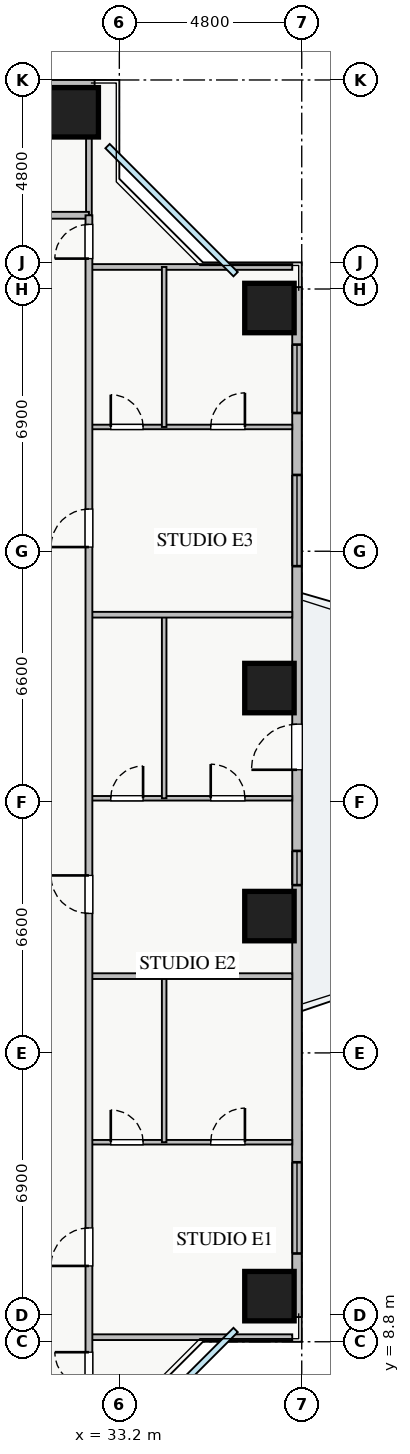
"""IFC4 building model, lengths in metres.
Left out: names, types, materials, properties, quantities, classifications, styles, units other than length and angle.
Written with IfcOpenShell. Run it as: python <this file> out.ifc"""

import sys

from ifc_helpers import new_model, si_unit, direction, frame, frame_2d, origin, origin_2d, place, context, subcontext, project, spatial, rectangle, extrude, source, transform, mapped, element, fill, save


model = new_model("IFC4")
c1 = context("Model", 3, precision=1e-05, world=origin(), true_north=direction((0.0, 1.0)))
c2 = subcontext(c1, "Body", "Model", "MODEL_VIEW")
j1 = project(units=[si_unit("LENGTHUNIT", "METRE"), si_unit("PLANEANGLEUNIT", "RADIAN")], contexts=[c1])
p1 = place(None, origin())
s1 = spatial("IfcSite", under=j1, at=p1, CompositionType="ELEMENT")
p2 = place(p1, origin())
s2 = spatial("IfcBuilding", under=s1, at=p2, CompositionType="ELEMENT")
p3 = place(p2, frame((0.0, 0.0, 56.75)))
s3 = spatial("IfcBuildingStorey", under=s2, at=p3, CompositionType="ELEMENT", Elevation=56.75)
m1 = source(origin(), c2, "Body", "SweptSolid", [
    extrude(rectangle(XDim=1.3, YDim=1.3, at=origin_2d()), origin(), (0.0, 0.0, 1.0), 3.25),
])
for number, where, z_axis, x_axis in (
    (1, (37.15, 10.0, 0.0), (0.0, 0.0, 1.0), (1.0, 0.0, 0.0)),
    (2, (37.15, 20.0, 0.0), (0.0, 0.0, 1.0), (1.0, 0.0, 0.0)),
    (3, (37.15, 26.0, 0.0), (0.0, 0.0, 1.0), (1.0, 0.0, 0.0)),
    (4, (37.15, 36.0, 0.0), (0.0, 0.0, 1.0), (1.0, 0.0, 0.0)),
    (5, (32.0, 41.15, 0.0), (0.0, 0.0, 1.0), (1.0, 0.0, 0.0)),
):
    element("IfcColumn", number, at=place(p3, frame(where, z_axis=z_axis, x_axis=x_axis)), inside=s3, PredefinedType="COLUMN", context=c2, shape_type="MappedRepresentation", body=[
        mapped(m1, transform((0.0, 0.0, 0.0), x_axis=(1.0, 0.0, 0.0), y_axis=(0.0, 1.0, 0.0), z_axis=(0.0, 0.0, 1.0), scale=1.0)),
    ])
p4 = place(p3, frame((5.45, 41.875, 0.0), z_axis=(0.0, 0.0, 1.0), x_axis=(1.0, 0.0, 0.0)))
e6 = element("IfcWall", 6, at=p4, inside=s3, PredefinedType="STANDARD", context=c2, shape_type="SweptSolid", body=[
    extrude(rectangle(XDim=27.1, YDim=0.25, at=frame_2d((13.55, 0.0))), origin(), (0.0, 0.0, 1.0), 2.61),
])
p5 = place(p4, frame((14.4, 0.0, 0.0)))
e7 = element("IfcOpeningElement", 7, at=p5, cuts=e6, PredefinedType="OPENING", context=c2, shape_type="SweptSolid", body=[
    extrude(rectangle(XDim=1.2, YDim=2.1, at=frame_2d((0.6, 1.05))), frame((0.0, 0.135, 0.0), z_axis=(0.0, -1.0, 0.0), x_axis=(1.0, 0.0, 0.0)), (0.0, 0.0, 1.0), 0.27),
])
p6 = place(p4, frame((1.5, 0.0, 0.9)))
e8 = element("IfcOpeningElement", 8, at=p6, cuts=e6, PredefinedType="OPENING", context=c2, shape_type="SweptSolid", body=[
    extrude(rectangle(XDim=1.5, YDim=1.5, at=frame_2d((0.75, 0.75))), frame((0.0, 0.135, 0.0), z_axis=(0.0, -1.0, 0.0), x_axis=(1.0, 0.0, 0.0)), (0.0, 0.0, 1.0), 0.27),
])
p7 = place(p4, frame((9.263, 0.0, 0.9)))
e9 = element("IfcOpeningElement", 9, at=p7, cuts=e6, PredefinedType="OPENING", context=c2, shape_type="SweptSolid", body=[
    extrude(rectangle(XDim=1.8, YDim=1.45, at=frame_2d((0.9, 0.725))), frame((0.0, 0.135, 0.0), z_axis=(0.0, -1.0, 0.0), x_axis=(1.0, 0.0, 0.0)), (0.0, 0.0, 1.0), 0.27),
])
p8 = place(p4, frame((18.774, 0.0, 0.9)))
e10 = element("IfcOpeningElement", 10, at=p8, cuts=e6, PredefinedType="OPENING", context=c2, shape_type="SweptSolid", body=[
    extrude(rectangle(XDim=1.5, YDim=1.5, at=frame_2d((0.75, 0.75))), frame((0.0, 0.135, 0.0), z_axis=(0.0, -1.0, 0.0), x_axis=(1.0, 0.0, 0.0)), (0.0, 0.0, 1.0), 0.27),
])
p9 = place(p4, frame((22.663, 0.0, 0.9)))
e11 = element("IfcOpeningElement", 11, at=p9, cuts=e6, PredefinedType="OPENING", context=c2, shape_type="SweptSolid", body=[
    extrude(rectangle(XDim=2.1, YDim=1.48, at=frame_2d((1.05, 0.74))), frame((0.0, 0.135, 0.0), z_axis=(0.0, -1.0, 0.0), x_axis=(1.0, 0.0, 0.0)), (0.0, 0.0, 1.0), 0.27),
])
p10 = place(p4, frame((5.134, 0.0, 0.9)))
e12 = element("IfcOpeningElement", 12, at=p10, cuts=e6, PredefinedType="OPENING", context=c2, shape_type="SweptSolid", body=[
    extrude(rectangle(XDim=2.4, YDim=1.5, at=frame_2d((1.2, 0.75))), frame((0.0, 0.135, 0.0), z_axis=(0.0, -1.0, 0.0), x_axis=(1.0, 0.0, 0.0)), (0.0, 0.0, 1.0), 0.27),
])
p11 = place(p3, frame((37.875, 9.45, 0.0), z_axis=(0.0, 0.0, 1.0), x_axis=(0.0, 1.0, 0.0)))
e13 = element("IfcWall", 13, at=p11, inside=s3, PredefinedType="STANDARD", context=c2, shape_type="SweptSolid", body=[
    extrude(rectangle(XDim=27.1, YDim=0.25, at=frame_2d((13.55, 0.0))), origin(), (0.0, 0.0, 1.0), 2.61),
])
p12 = place(p11, frame((14.4, 0.0, 0.0)))
e14 = element("IfcOpeningElement", 14, at=p12, cuts=e13, PredefinedType="OPENING", context=c2, shape_type="SweptSolid", body=[
    extrude(rectangle(XDim=1.2, YDim=2.1, at=frame_2d((0.6, 1.05))), frame((0.0, 0.135, 0.0), z_axis=(0.0, -1.0, 0.0), x_axis=(1.0, 0.0, 0.0)), (0.0, 0.0, 1.0), 0.27),
])
p13 = place(p11, frame((1.673, 0.0, 0.9)))
e15 = element("IfcOpeningElement", 15, at=p13, cuts=e13, PredefinedType="OPENING", context=c2, shape_type="SweptSolid", body=[
    extrude(rectangle(XDim=2.4, YDim=1.5, at=frame_2d((1.2, 0.75))), frame((0.0, 0.135, 0.0), z_axis=(0.0, -1.0, 0.0), x_axis=(1.0, 0.0, 0.0)), (0.0, 0.0, 1.0), 0.27),
])
p14 = place(p11, frame((23.788, 0.0, 0.9)))
e16 = element("IfcOpeningElement", 16, at=p14, cuts=e13, PredefinedType="OPENING", context=c2, shape_type="SweptSolid", body=[
    extrude(rectangle(XDim=1.8, YDim=1.5, at=frame_2d((0.9, 0.75))), frame((0.0, 0.135, 0.0), z_axis=(0.0, -1.0, 0.0), x_axis=(1.0, 0.0, 0.0)), (0.0, 0.0, 1.0), 0.27),
])
p15 = place(p11, frame((19.758, 0.0, 0.9)))
e17 = element("IfcOpeningElement", 17, at=p15, cuts=e13, PredefinedType="OPENING", context=c2, shape_type="SweptSolid", body=[
    extrude(rectangle(XDim=2.4, YDim=1.5, at=frame_2d((1.2, 0.75))), frame((0.0, 0.135, 0.0), z_axis=(0.0, -1.0, 0.0), x_axis=(1.0, 0.0, 0.0)), (0.0, 0.0, 1.0), 0.27),
])
p16 = place(p11, frame((11.365, 0.0, 0.9)))
e18 = element("IfcOpeningElement", 18, at=p16, cuts=e13, PredefinedType="OPENING", context=c2, shape_type="SweptSolid", body=[
    extrude(rectangle(XDim=0.9, YDim=1.2, at=frame_2d((0.45, 0.6))), frame((0.0, 0.135, 0.0), z_axis=(0.0, -1.0, 0.0), x_axis=(1.0, 0.0, 0.0)), (0.0, 0.0, 1.0), 0.27),
])
p17 = place(p3, frame((32.4, 38.44, 0.0), z_axis=(0.0, 0.0, 1.0), x_axis=(0.0, 1.0, 0.0)))
e19 = element("IfcWall", 19, at=p17, inside=s3, PredefinedType="PARTITIONING", context=c2, shape_type="SweptSolid", body=[
    extrude(rectangle(XDim=3.31, YDim=0.15, at=frame_2d((1.655, 0.0))), origin(), (0.0, 0.0, 1.0), 3.07),
])
p18 = place(p3, frame((8.82, 38.44, 0.0), z_axis=(0.0, 0.0, 1.0), x_axis=(1.0, 0.0, 0.0)))
e20 = element("IfcWall", 20, at=p18, inside=s3, PredefinedType="PARTITIONING", context=c2, shape_type="SweptSolid", body=[
    extrude(rectangle(XDim=23.58, YDim=0.18, at=frame_2d((11.79, 0.0))), origin(), (0.0, 0.0, 1.0), 3.07),
])
p19 = place(p18, frame((5.99, 0.0, 0.0)))
e21 = element("IfcOpeningElement", 21, at=p19, cuts=e20, PredefinedType="OPENING", context=c2, shape_type="SweptSolid", body=[
    extrude(rectangle(XDim=1.0, YDim=2.05, at=frame_2d((0.5, 1.025))), frame((0.0, 0.1, 0.0), z_axis=(0.0, -1.0, 0.0), x_axis=(1.0, 0.0, 0.0)), (0.0, 0.0, 1.0), 0.2),
])
p20 = place(p18, frame((17.78, 0.0, 0.0)))
e22 = element("IfcOpeningElement", 22, at=p20, cuts=e20, PredefinedType="OPENING", context=c2, shape_type="SweptSolid", body=[
    extrude(rectangle(XDim=1.0, YDim=2.05, at=frame_2d((0.5, 1.025))), frame((0.0, 0.1, 0.0), z_axis=(0.0, -1.0, 0.0), x_axis=(1.0, 0.0, 0.0)), (0.0, 0.0, 1.0), 0.2),
])
for number, where, z_axis, x_axis in (
    (23, (32.4, 37.08, 0.0), (0.0, 0.0, 1.0), (1.0, 0.0, 0.0)),
    (24, (32.4, 8.92, 0.0), (0.0, 0.0, 1.0), (1.0, 0.0, 0.0)),
):
    element("IfcWall", number, at=place(p3, frame(where, z_axis=z_axis, x_axis=x_axis)), inside=s3, PredefinedType="PARTITIONING", context=c2, shape_type="SweptSolid", body=[
        extrude(rectangle(XDim=5.35, YDim=0.15, at=frame_2d((2.675, 0.0))), origin(), (0.0, 0.0, 1.0), 3.07),
    ])
p21 = place(p3, frame((32.4, 14.05, 0.0), z_axis=(0.0, 0.0, 1.0), x_axis=(1.0, 0.0, 0.0)))
e25 = element("IfcWall", 25, at=p21, inside=s3, PredefinedType="PLUMBINGWALL", context=c2, shape_type="SweptSolid", body=[
    extrude(rectangle(XDim=5.35, YDim=0.12, at=frame_2d((2.675, 0.0))), origin(), (0.0, 0.0, 1.0), 3.07),
])
p22 = place(p21, frame((0.575, 0.0, 0.0)))
e26 = element("IfcOpeningElement", 26, at=p22, cuts=e25, PredefinedType="OPENING", context=c2, shape_type="SweptSolid", body=[
    extrude(rectangle(XDim=0.85, YDim=2.05, at=frame_2d((0.425, 1.025))), frame((0.0, 0.07, 0.0), z_axis=(0.0, -1.0, 0.0), x_axis=(1.0, 0.0, 0.0)), (0.0, 0.0, 1.0), 0.14),
])
p23 = place(p21, frame((3.205, 0.0, 0.0)))
e27 = element("IfcOpeningElement", 27, at=p23, cuts=e25, PredefinedType="OPENING", context=c2, shape_type="SweptSolid", body=[
    extrude(rectangle(XDim=0.9, YDim=2.05, at=frame_2d((0.45, 1.025))), frame((0.0, 0.07, 0.0), z_axis=(0.0, -1.0, 0.0), x_axis=(1.0, 0.0, 0.0)), (0.0, 0.0, 1.0), 0.14),
])
p24 = place(p3, frame((34.38, 14.05, 0.0), z_axis=(0.0, 0.0, 1.0), x_axis=(0.0, 1.0, 0.0)))
e28 = element("IfcWall", 28, at=p24, inside=s3, PredefinedType="PLUMBINGWALL", context=c2, shape_type="SweptSolid", body=[
    extrude(rectangle(XDim=4.37, YDim=0.12, at=frame_2d((2.185, 0.0))), origin(), (0.0, 0.0, 1.0), 3.07),
])
p25 = place(p3, frame((32.4, 23.1, 0.0), z_axis=(0.0, 0.0, 1.0), x_axis=(1.0, 0.0, 0.0)))
e29 = element("IfcWall", 29, at=p25, inside=s3, PredefinedType="PLUMBINGWALL", context=c2, shape_type="SweptSolid", body=[
    extrude(rectangle(XDim=5.35, YDim=0.12, at=frame_2d((2.675, 0.0))), origin(), (0.0, 0.0, 1.0), 3.07),
])
p26 = place(p25, frame((0.575, 0.0, 0.0)))
e30 = element("IfcOpeningElement", 30, at=p26, cuts=e29, PredefinedType="OPENING", context=c2, shape_type="SweptSolid", body=[
    extrude(rectangle(XDim=0.85, YDim=2.05, at=frame_2d((0.425, 1.025))), frame((0.0, 0.07, 0.0), z_axis=(0.0, -1.0, 0.0), x_axis=(1.0, 0.0, 0.0)), (0.0, 0.0, 1.0), 0.14),
])
p27 = place(p25, frame((3.205, 0.0, 0.0)))
e31 = element("IfcOpeningElement", 31, at=p27, cuts=e29, PredefinedType="OPENING", context=c2, shape_type="SweptSolid", body=[
    extrude(rectangle(XDim=0.9, YDim=2.05, at=frame_2d((0.45, 1.025))), frame((0.0, 0.07, 0.0), z_axis=(0.0, -1.0, 0.0), x_axis=(1.0, 0.0, 0.0)), (0.0, 0.0, 1.0), 0.14),
])
p28 = place(p3, frame((34.38, 23.1, 0.0), z_axis=(0.0, 0.0, 1.0), x_axis=(0.0, 1.0, 0.0)))
e32 = element("IfcWall", 32, at=p28, inside=s3, PredefinedType="PLUMBINGWALL", context=c2, shape_type="SweptSolid", body=[
    extrude(rectangle(XDim=4.83, YDim=0.12, at=frame_2d((2.415, 0.0))), origin(), (0.0, 0.0, 1.0), 3.07),
])
p29 = place(p3, frame((32.4, 18.42, 0.0), z_axis=(0.0, 0.0, 1.0), x_axis=(1.0, 0.0, 0.0)))
e33 = element("IfcWall", 33, at=p29, inside=s3, PredefinedType="PARTITIONING", context=c2, shape_type="SweptSolid", body=[
    extrude(rectangle(XDim=5.35, YDim=0.15, at=frame_2d((2.675, 0.0))), origin(), (0.0, 0.0, 1.0), 2.715),
])
p30 = place(p3, frame((32.4, 32.87, 0.0), z_axis=(0.0, 0.0, 1.0), x_axis=(1.0, 0.0, 0.0)))
e34 = element("IfcWall", 34, at=p30, inside=s3, PredefinedType="PLUMBINGWALL", context=c2, shape_type="SweptSolid", body=[
    extrude(rectangle(XDim=5.35, YDim=0.12, at=frame_2d((2.675, 0.0))), origin(), (0.0, 0.0, 1.0), 3.07),
])
p31 = place(p30, frame((0.575, 0.0, 0.0)))
e35 = element("IfcOpeningElement", 35, at=p31, cuts=e34, PredefinedType="OPENING", context=c2, shape_type="SweptSolid", body=[
    extrude(rectangle(XDim=0.85, YDim=2.05, at=frame_2d((0.425, 1.025))), frame((0.0, 0.07, 0.0), z_axis=(0.0, -1.0, 0.0), x_axis=(1.0, 0.0, 0.0)), (0.0, 0.0, 1.0), 0.14),
])
p32 = place(p30, frame((3.205, 0.0, 0.0)))
e36 = element("IfcOpeningElement", 36, at=p32, cuts=e34, PredefinedType="OPENING", context=c2, shape_type="SweptSolid", body=[
    extrude(rectangle(XDim=0.9, YDim=2.05, at=frame_2d((0.45, 1.025))), frame((0.0, 0.07, 0.0), z_axis=(0.0, -1.0, 0.0), x_axis=(1.0, 0.0, 0.0)), (0.0, 0.0, 1.0), 0.14),
])
p33 = place(p3, frame((34.38, 32.87, 0.0), z_axis=(0.0, 0.0, 1.0), x_axis=(0.0, 1.0, 0.0)))
e37 = element("IfcWall", 37, at=p33, inside=s3, PredefinedType="PLUMBINGWALL", context=c2, shape_type="SweptSolid", body=[
    extrude(rectangle(XDim=4.21, YDim=0.12, at=frame_2d((2.105, 0.0))), origin(), (0.0, 0.0, 1.0), 3.07),
])
p34 = place(p3, frame((32.4, 27.93, 0.0), z_axis=(0.0, 0.0, 1.0), x_axis=(1.0, 0.0, 0.0)))
e38 = element("IfcWall", 38, at=p34, inside=s3, PredefinedType="PARTITIONING", context=c2, shape_type="SweptSolid", body=[
    extrude(rectangle(XDim=5.35, YDim=0.15, at=frame_2d((2.675, 0.0))), origin(), (0.0, 0.0, 1.0), 2.715),
])
p35 = place(p3, frame((32.4, 7.21, 0.0), z_axis=(0.0, 0.0, 1.0), x_axis=(0.0, 1.0, 0.0)))
e39 = element("IfcWall", 39, at=p35, inside=s3, PredefinedType="PARTITIONING", context=c2, shape_type="SweptSolid", body=[
    extrude(rectangle(XDim=31.23, YDim=0.18, at=frame_2d((15.615, 0.0))), origin(), (0.0, 0.0, 1.0), 2.815),
])
p36 = place(p35, frame((30.09, 0.0, 0.0)))
e40 = element("IfcOpeningElement", 40, at=p36, cuts=e39, PredefinedType="OPENING", context=c2, shape_type="SweptSolid", body=[
    extrude(rectangle(XDim=0.9, YDim=2.05, at=frame_2d((0.45, 1.025))), frame((0.0, 0.1, 0.0), z_axis=(0.0, -1.0, 0.0), x_axis=(1.0, 0.0, 0.0)), (0.0, 0.0, 1.0), 0.2),
])
p37 = place(p35, frame((0.415, 0.0, 0.0)))
e41 = element("IfcOpeningElement", 41, at=p37, cuts=e39, PredefinedType="OPENING", context=c2, shape_type="SweptSolid", body=[
    extrude(rectangle(XDim=0.9, YDim=2.05, at=frame_2d((0.45, 1.025))), frame((0.0, 0.1, 0.0), z_axis=(0.0, -1.0, 0.0), x_axis=(1.0, 0.0, 0.0)), (0.0, 0.0, 1.0), 0.2),
])
p38 = place(p35, frame((3.585, 0.0, 0.0)))
e42 = element("IfcOpeningElement", 42, at=p38, cuts=e39, PredefinedType="OPENING", context=c2, shape_type="SweptSolid", body=[
    extrude(rectangle(XDim=1.0, YDim=2.05, at=frame_2d((0.5, 1.025))), frame((0.0, 0.1, 0.0), z_axis=(0.0, -1.0, 0.0), x_axis=(1.0, 0.0, 0.0)), (0.0, 0.0, 1.0), 0.2),
])
p39 = place(p35, frame((12.86, 0.0, 0.0)))
e43 = element("IfcOpeningElement", 43, at=p39, cuts=e39, PredefinedType="OPENING", context=c2, shape_type="SweptSolid", body=[
    extrude(rectangle(XDim=1.0, YDim=2.05, at=frame_2d((0.5, 1.025))), frame((0.0, 0.1, 0.0), z_axis=(0.0, -1.0, 0.0), x_axis=(1.0, 0.0, 0.0)), (0.0, 0.0, 1.0), 0.2),
])
p40 = place(p35, frame((22.5, 0.0, 0.0)))
e44 = element("IfcOpeningElement", 44, at=p40, cuts=e39, PredefinedType="OPENING", context=c2, shape_type="SweptSolid", body=[
    extrude(rectangle(XDim=1.0, YDim=2.05, at=frame_2d((0.5, 1.025))), frame((0.0, 0.1, 0.0), z_axis=(0.0, -1.0, 0.0), x_axis=(1.0, 0.0, 0.0)), (0.0, 0.0, 1.0), 0.2),
])
m2 = source(origin(), c2, "Body", "SweptSolid", [
    extrude(rectangle(XDim=1.2, YDim=2.1, at=frame_2d((0.6, 1.05))), frame((0.0, 0.025, 0.0), z_axis=(0.0, -1.0, 0.0), x_axis=(1.0, 0.0, 0.0)), (0.0, 0.0, 1.0), 0.05),
])
p41 = place(p12, origin())
e45 = element("IfcDoor", 45, at=p41, inside=s3, OperationType="SINGLE_SWING_LEFT", PredefinedType="DOOR", context=c2, shape_type="MappedRepresentation", body=[
    mapped(m2, transform((0.0, 0.0, 0.0), x_axis=(1.0, 0.0, 0.0), y_axis=(0.0, 1.0, 0.0), z_axis=(0.0, 0.0, 1.0), scale=1.0)),
])
fill(e14, e45)
m3 = source(origin(), c2, "Body", "SweptSolid", [
    extrude(rectangle(XDim=2.4, YDim=1.5, at=frame_2d((1.2, 0.75))), frame((0.0, 0.03, 0.0), z_axis=(0.0, -1.0, 0.0), x_axis=(1.0, 0.0, 0.0)), (0.0, 0.0, 1.0), 0.06),
])
p42 = place(p13, origin())
e46 = element("IfcWindow", 46, at=p42, inside=s3, PartitioningType="TRIPLE_PANEL_VERTICAL", PredefinedType="WINDOW", context=c2, shape_type="MappedRepresentation", body=[
    mapped(m3, transform((0.0, 0.0, 0.0), x_axis=(1.0, 0.0, 0.0), y_axis=(0.0, 1.0, 0.0), z_axis=(0.0, 0.0, 1.0), scale=1.0)),
])
fill(e15, e46)
m4 = source(origin(), c2, "Body", "SweptSolid", [
    extrude(rectangle(XDim=1.8, YDim=1.5, at=frame_2d((0.9, 0.75))), frame((0.0, 0.03, 0.0), z_axis=(0.0, -1.0, 0.0), x_axis=(1.0, 0.0, 0.0)), (0.0, 0.0, 1.0), 0.06),
])
p43 = place(p14, origin())
e47 = element("IfcWindow", 47, at=p43, inside=s3, PartitioningType="TRIPLE_PANEL_VERTICAL", PredefinedType="WINDOW", context=c2, shape_type="MappedRepresentation", body=[
    mapped(m4, transform((0.0, 0.0, 0.0), x_axis=(1.0, 0.0, 0.0), y_axis=(0.0, 1.0, 0.0), z_axis=(0.0, 0.0, 1.0), scale=1.0)),
])
fill(e16, e47)
m5 = source(origin(), c2, "Body", "SweptSolid", [
    extrude(rectangle(XDim=0.85, YDim=2.05, at=frame_2d((0.425, 1.025))), frame((0.0, 0.025, 0.0), z_axis=(0.0, -1.0, 0.0), x_axis=(1.0, 0.0, 0.0)), (0.0, 0.0, 1.0), 0.05),
])
p44 = place(p22, origin())
e48 = element("IfcDoor", 48, at=p44, inside=s3, OperationType="SINGLE_SWING_LEFT", PredefinedType="DOOR", context=c2, shape_type="MappedRepresentation", body=[
    mapped(m5, transform((0.0, 0.0, 0.0), x_axis=(1.0, 0.0, 0.0), y_axis=(0.0, 1.0, 0.0), z_axis=(0.0, 0.0, 1.0), scale=1.0)),
])
fill(e26, e48)
m6 = source(origin(), c2, "Body", "SweptSolid", [
    extrude(rectangle(XDim=0.9, YDim=2.05, at=frame_2d((0.45, 1.025))), frame((0.0, 0.025, 0.0), z_axis=(0.0, -1.0, 0.0), x_axis=(1.0, 0.0, 0.0)), (0.0, 0.0, 1.0), 0.05),
])
p45 = place(p23, origin())
e49 = element("IfcDoor", 49, at=p45, inside=s3, OperationType="SINGLE_SWING_RIGHT", PredefinedType="DOOR", context=c2, shape_type="MappedRepresentation", body=[
    mapped(m6, transform((0.0, 0.0, 0.0), x_axis=(1.0, 0.0, 0.0), y_axis=(0.0, 1.0, 0.0), z_axis=(0.0, 0.0, 1.0), scale=1.0)),
])
fill(e27, e49)
p46 = place(p26, origin())
e50 = element("IfcDoor", 50, at=p46, inside=s3, OperationType="SINGLE_SWING_RIGHT", PredefinedType="DOOR", context=c2, shape_type="MappedRepresentation", body=[
    mapped(m5, transform((0.0, 0.0, 0.0), x_axis=(1.0, 0.0, 0.0), y_axis=(0.0, 1.0, 0.0), z_axis=(0.0, 0.0, 1.0), scale=1.0)),
])
fill(e30, e50)
p47 = place(p27, origin())
e51 = element("IfcDoor", 51, at=p47, inside=s3, OperationType="SINGLE_SWING_LEFT", PredefinedType="DOOR", context=c2, shape_type="MappedRepresentation", body=[
    mapped(m6, transform((0.0, 0.0, 0.0), x_axis=(1.0, 0.0, 0.0), y_axis=(0.0, 1.0, 0.0), z_axis=(0.0, 0.0, 1.0), scale=1.0)),
])
fill(e31, e51)
p48 = place(p31, origin())
e52 = element("IfcDoor", 52, at=p48, inside=s3, OperationType="SINGLE_SWING_LEFT", PredefinedType="DOOR", context=c2, shape_type="MappedRepresentation", body=[
    mapped(m5, transform((0.0, 0.0, 0.0), x_axis=(1.0, 0.0, 0.0), y_axis=(0.0, 1.0, 0.0), z_axis=(0.0, 0.0, 1.0), scale=1.0)),
])
fill(e35, e52)
p49 = place(p32, origin())
e53 = element("IfcDoor", 53, at=p49, inside=s3, OperationType="SINGLE_SWING_RIGHT", PredefinedType="DOOR", context=c2, shape_type="MappedRepresentation", body=[
    mapped(m6, transform((0.0, 0.0, 0.0), x_axis=(1.0, 0.0, 0.0), y_axis=(0.0, 1.0, 0.0), z_axis=(0.0, 0.0, 1.0), scale=1.0)),
])
fill(e36, e53)
p50 = place(p36, origin())
e54 = element("IfcDoor", 54, at=p50, inside=s3, OperationType="SINGLE_SWING_LEFT", PredefinedType="DOOR", context=c2, shape_type="MappedRepresentation", body=[
    mapped(m6, transform((0.0, 0.0, 0.0), x_axis=(1.0, 0.0, 0.0), y_axis=(0.0, 1.0, 0.0), z_axis=(0.0, 0.0, 1.0), scale=1.0)),
])
fill(e40, e54)
p51 = place(p37, origin())
e55 = element("IfcDoor", 55, at=p51, inside=s3, OperationType="SINGLE_SWING_RIGHT", PredefinedType="DOOR", context=c2, shape_type="MappedRepresentation", body=[
    mapped(m6, transform((0.0, 0.0, 0.0), x_axis=(1.0, 0.0, 0.0), y_axis=(0.0, 1.0, 0.0), z_axis=(0.0, 0.0, 1.0), scale=1.0)),
])
fill(e41, e55)
m7 = source(origin(), c2, "Body", "SweptSolid", [
    extrude(rectangle(XDim=1.0, YDim=2.05, at=frame_2d((0.5, 1.025))), frame((0.0, 0.025, 0.0), z_axis=(0.0, -1.0, 0.0), x_axis=(1.0, 0.0, 0.0)), (0.0, 0.0, 1.0), 0.05),
])
p52 = place(p38, origin())
e56 = element("IfcDoor", 56, at=p52, inside=s3, OperationType="SINGLE_SWING_LEFT", PredefinedType="DOOR", context=c2, shape_type="MappedRepresentation", body=[
    mapped(m7, transform((0.0, 0.0, 0.0), x_axis=(1.0, 0.0, 0.0), y_axis=(0.0, 1.0, 0.0), z_axis=(0.0, 0.0, 1.0), scale=1.0)),
])
fill(e42, e56)
p53 = place(p39, origin())
e57 = element("IfcDoor", 57, at=p53, inside=s3, OperationType="SINGLE_SWING_RIGHT", PredefinedType="DOOR", context=c2, shape_type="MappedRepresentation", body=[
    mapped(m7, transform((0.0, 0.0, 0.0), x_axis=(1.0, 0.0, 0.0), y_axis=(0.0, 1.0, 0.0), z_axis=(0.0, 0.0, 1.0), scale=1.0)),
])
fill(e43, e57)
p54 = place(p40, origin())
e58 = element("IfcDoor", 58, at=p54, inside=s3, OperationType="SINGLE_SWING_LEFT", PredefinedType="DOOR", context=c2, shape_type="MappedRepresentation", body=[
    mapped(m7, transform((0.0, 0.0, 0.0), x_axis=(1.0, 0.0, 0.0), y_axis=(0.0, 1.0, 0.0), z_axis=(0.0, 0.0, 1.0), scale=1.0)),
])
fill(e44, e58)
p55 = place(p15, origin())
e59 = element("IfcWindow", 59, at=p55, inside=s3, PartitioningType="TRIPLE_PANEL_VERTICAL", PredefinedType="WINDOW", context=c2, shape_type="MappedRepresentation", body=[
    mapped(m3, transform((0.0, 0.0, 0.0), x_axis=(1.0, 0.0, 0.0), y_axis=(0.0, 1.0, 0.0), z_axis=(0.0, 0.0, 1.0), scale=1.0)),
])
fill(e17, e59)
m8 = source(origin(), c2, "Body", "SweptSolid", [
    extrude(rectangle(XDim=0.9, YDim=1.2, at=frame_2d((0.45, 0.6))), frame((0.0, 0.03, 0.0), z_axis=(0.0, -1.0, 0.0), x_axis=(1.0, 0.0, 0.0)), (0.0, 0.0, 1.0), 0.06),
])
p56 = place(p16, origin())
e60 = element("IfcWindow", 60, at=p56, inside=s3, PartitioningType="SINGLE_PANEL", PredefinedType="WINDOW", context=c2, shape_type="MappedRepresentation", body=[
    mapped(m8, transform((0.0, 0.0, 0.0), x_axis=(1.0, 0.0, 0.0), y_axis=(0.0, 1.0, 0.0), z_axis=(0.0, 0.0, 1.0), scale=1.0)),
])
fill(e18, e60)
save(model, sys.argv[1])
